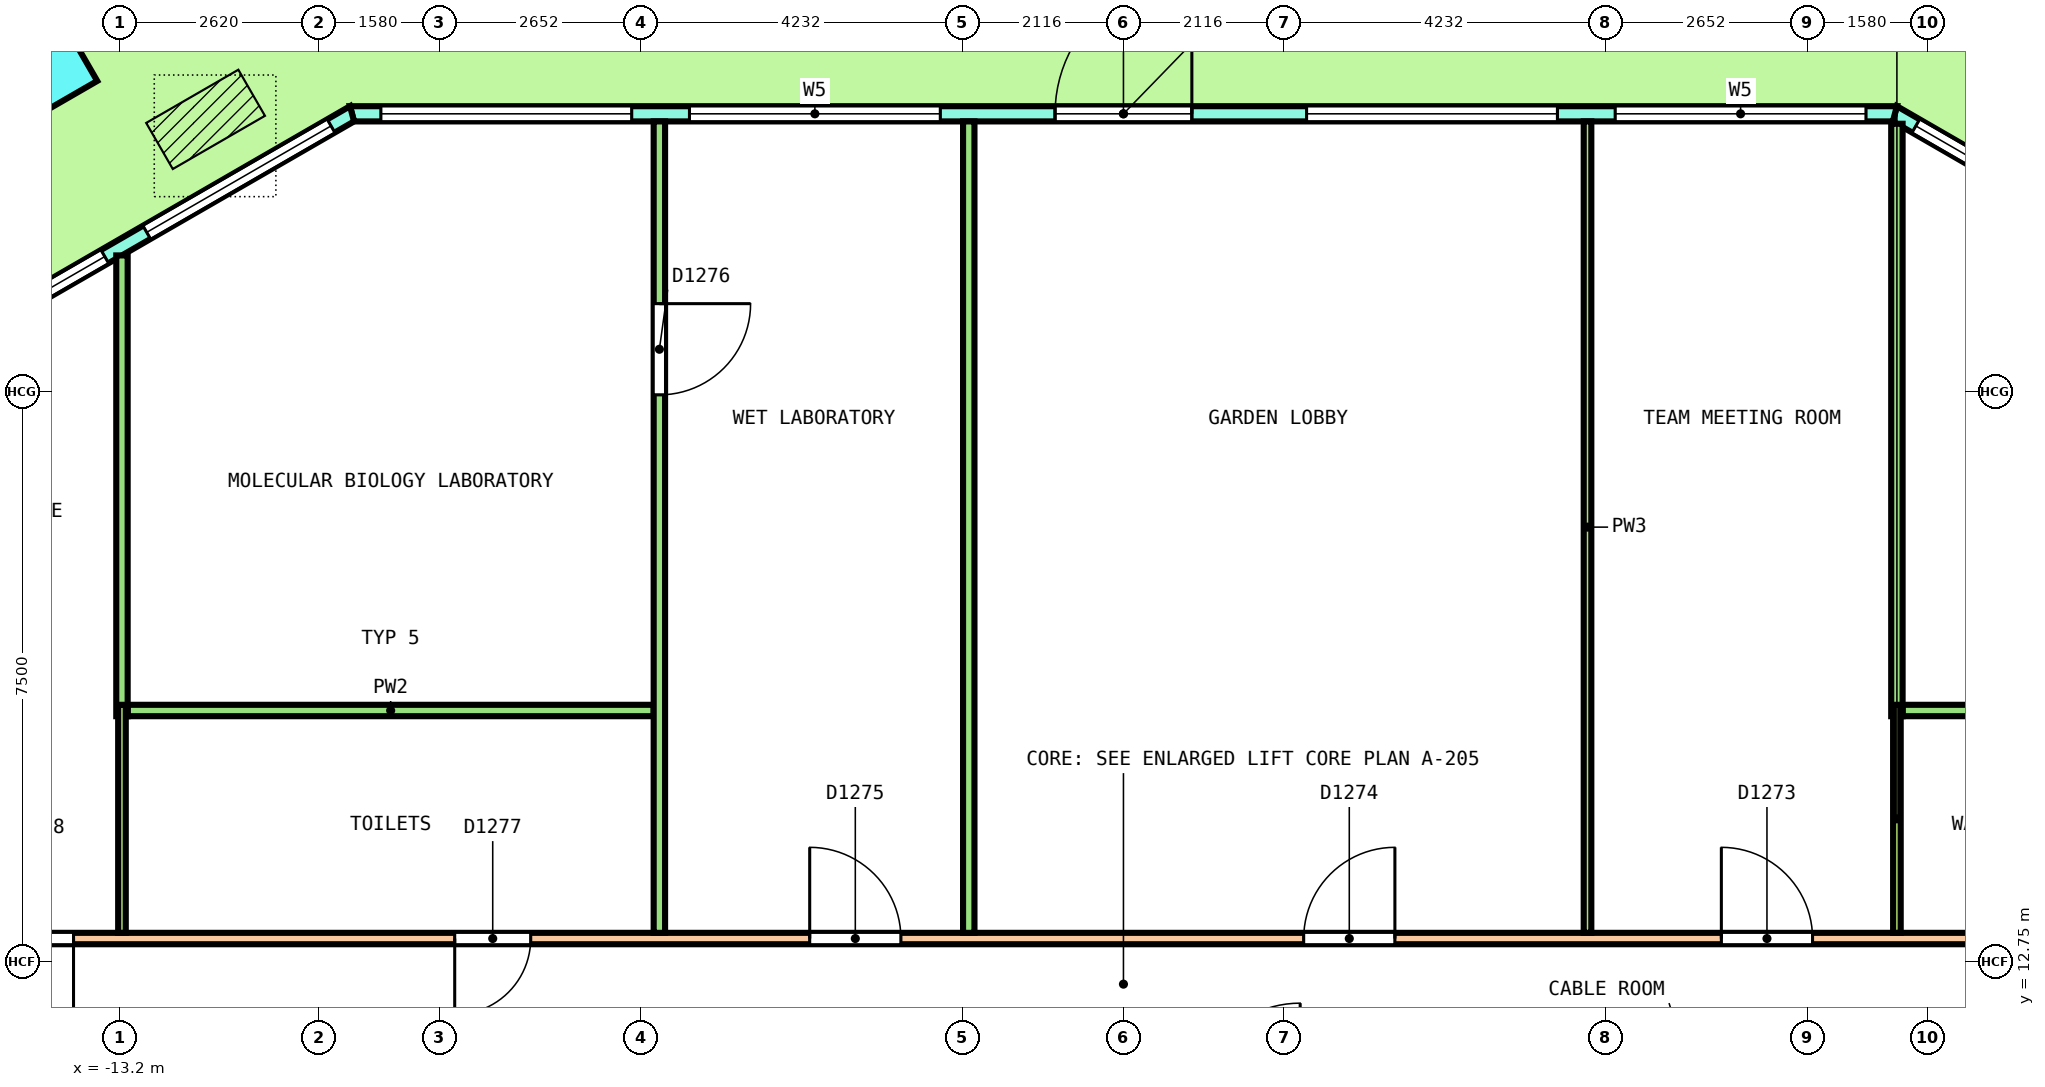
"""IFC4 building model, lengths in metres.
Left out: names, types, materials, properties, quantities, classifications, styles, units other than length and angle.
Written with IfcOpenShell. Run it as: python <this file> out.ifc"""

import sys

from ifc_helpers import new_model, si_unit, direction, frame, frame_2d, origin, origin_2d, place, context, subcontext, project, spatial, polyline, rectangle, outline, extrude, element, fill, save


model = new_model("IFC4")
c1 = context("Model", 3, precision=1e-05, world=origin(), true_north=direction((0.0, 1.0)))
c2 = subcontext(c1, "Body", "Model", "MODEL_VIEW")
j1 = project(units=[si_unit("LENGTHUNIT", "METRE"), si_unit("PLANEANGLEUNIT", "RADIAN")], contexts=[c1])
p1 = place(None, origin())
s1 = spatial("IfcSite", under=j1, at=p1, CompositionType="ELEMENT")
p2 = place(p1, origin())
s2 = spatial("IfcBuilding", under=s1, at=p2, CompositionType="ELEMENT")
p3 = place(p2, frame((0.0, 0.0, 23.4)))
s3 = spatial("IfcBuildingStorey", under=s2, at=p3, CompositionType="ELEMENT", Elevation=23.4)
p4 = place(p3, frame((-14.526, 24.606, 0.0), z_axis=(-0.036265236264, 0.0, 0.999342199969), x_axis=(-0.865313546461, -0.500246354177, -0.031401456084)))
e1 = element("IfcColumn", 1, at=p4, inside=s3, PredefinedType="COLUMN", context=c2, shape_type="SweptSolid", body=[
    extrude(rectangle(XDim=1.5, YDim=1.5, at=origin_2d()), origin(), (0.0, 0.0, 1.0), 4.053),
])
p5 = place(p3, frame((16.103, 20.463, 0.0), z_axis=(0.0, 0.0, 1.0), x_axis=(-0.866029458321, 0.49999297727, 0.0)))
e2 = element("IfcWall", 2, at=p5, inside=s3, PredefinedType="SOLIDWALL", context=c2, shape_type="SweptSolid", body=[
    extrude(outline(polyline([(-0.027, -0.1), (1.128, -0.1), (2.282, -0.1), (3.437, -0.1), (4.592, -0.1), (5.747, -0.1), (6.901, -0.1), (6.848, 0.1), (5.711, 0.1), (4.574, 0.1), (3.437, 0.1), (2.301, 0.1), (1.164, 0.1), (0.027, 0.1), (-0.027, -0.1)])), origin(), (0.0, 0.0, 1.0), 4.1),
])
p6 = place(p5, frame((0.319, 0.0, 0.1)))
e3 = element("IfcOpeningElement", 3, at=p6, cuts=e2, PredefinedType="OPENING", context=c2, shape_type="SweptSolid", body=[
    extrude(rectangle(XDim=2.8, YDim=2.9, at=frame_2d((1.4, 1.45))), frame((0.0, 0.11, 0.0), z_axis=(0.0, -1.0, 0.0), x_axis=(1.0, 0.0, 0.0)), (0.0, 0.0, 1.0), 0.22),
])
p7 = place(p5, frame((3.756, 0.0, 0.1)))
e4 = element("IfcOpeningElement", 4, at=p7, cuts=e2, PredefinedType="OPENING", context=c2, shape_type="SweptSolid", body=[
    extrude(rectangle(XDim=2.8, YDim=2.9, at=frame_2d((1.4, 1.45))), frame((0.0, 0.11, 0.0), z_axis=(0.0, -1.0, 0.0), x_axis=(1.0, 0.0, 0.0)), (0.0, 0.0, 1.0), 0.22),
])
p8 = place(p3, frame((10.149, 23.9, 0.0), z_axis=(0.0, 0.0, 1.0), x_axis=(-1.0, 0.0, 0.0)))
e5 = element("IfcWall", 5, at=p8, inside=s3, PredefinedType="SOLIDWALL", context=c2, shape_type="SweptSolid", body=[
    extrude(outline(polyline([(-0.027, -0.1), (0.991, -0.1), (2.008, -0.1), (3.026, -0.1), (4.043, -0.1), (5.061, -0.1), (6.079, -0.1), (7.096, -0.1), (8.114, -0.1), (9.131, -0.1), (10.149, -0.1), (11.167, -0.1), (12.184, -0.1), (13.202, -0.1), (14.219, -0.1), (15.237, -0.1), (16.254, -0.1), (17.272, -0.1), (18.29, -0.1), (19.307, -0.1), (20.325, -0.1), (20.271, 0.1), (19.259, 0.1), (18.247, 0.1), (17.234, 0.1), (16.222, 0.1), (15.21, 0.1), (14.198, 0.1), (13.186, 0.1), (12.173, 0.1), (11.161, 0.1), (10.149, 0.1), (9.137, 0.1), (8.125, 0.1), (7.112, 0.1), (6.1, 0.1), (5.088, 0.1), (4.076, 0.1), (3.063, 0.1), (2.051, 0.1), (1.039, 0.1), (0.027, 0.1), (-0.027, -0.1)])), origin(), (0.0, 0.0, 1.0), 4.1),
])
p9 = place(p8, frame((0.38, 0.0, 0.1)))
e6 = element("IfcOpeningElement", 6, at=p9, cuts=e5, PredefinedType="OPENING", context=c2, shape_type="SweptSolid", body=[
    extrude(rectangle(XDim=3.3, YDim=2.9, at=frame_2d((1.65, 1.45))), frame((0.0, 0.11, 0.0), z_axis=(0.0, -1.0, 0.0), x_axis=(1.0, 0.0, 0.0)), (0.0, 0.0, 1.0), 0.22),
])
p10 = place(p8, frame((4.439, 0.0, 0.1)))
e7 = element("IfcOpeningElement", 7, at=p10, cuts=e5, PredefinedType="OPENING", context=c2, shape_type="SweptSolid", body=[
    extrude(rectangle(XDim=3.3, YDim=2.9, at=frame_2d((1.65, 1.45))), frame((0.0, 0.11, 0.0), z_axis=(0.0, -1.0, 0.0), x_axis=(1.0, 0.0, 0.0)), (0.0, 0.0, 1.0), 0.22),
])
p11 = place(p8, frame((9.249, 0.0, 0.0)))
e8 = element("IfcOpeningElement", 8, at=p11, cuts=e5, PredefinedType="OPENING", context=c2, shape_type="SweptSolid", body=[
    extrude(rectangle(XDim=1.8, YDim=2.4, at=frame_2d((0.9, 1.2))), frame((0.0, 0.11, 0.0), z_axis=(0.0, -1.0, 0.0), x_axis=(1.0, 0.0, 0.0)), (0.0, 0.0, 1.0), 0.22),
])
p12 = place(p8, frame((9.249, 0.0, 2.55)))
e9 = element("IfcOpeningElement", 9, at=p12, cuts=e5, PredefinedType="OPENING", context=c2, shape_type="SweptSolid", body=[
    extrude(rectangle(XDim=1.8, YDim=0.45, at=frame_2d((0.9, 0.225))), frame((0.0, 0.11, 0.0), z_axis=(0.0, -1.0, 0.0), x_axis=(1.0, 0.0, 0.0)), (0.0, 0.0, 1.0), 0.22),
])
p13 = place(p8, frame((12.559, 0.0, 0.1)))
e10 = element("IfcOpeningElement", 10, at=p13, cuts=e5, PredefinedType="OPENING", context=c2, shape_type="SweptSolid", body=[
    extrude(rectangle(XDim=3.3, YDim=2.9, at=frame_2d((1.65, 1.45))), frame((0.0, 0.11, 0.0), z_axis=(0.0, -1.0, 0.0), x_axis=(1.0, 0.0, 0.0)), (0.0, 0.0, 1.0), 0.22),
])
p14 = place(p8, frame((16.618, 0.0, 0.1)))
e11 = element("IfcOpeningElement", 11, at=p14, cuts=e5, PredefinedType="OPENING", context=c2, shape_type="SweptSolid", body=[
    extrude(rectangle(XDim=3.3, YDim=2.9, at=frame_2d((1.65, 1.45))), frame((0.0, 0.11, 0.0), z_axis=(0.0, -1.0, 0.0), x_axis=(1.0, 0.0, 0.0)), (0.0, 0.0, 1.0), 0.22),
])
p15 = place(p3, frame((-10.149, 23.9, 0.0), z_axis=(0.0, 0.0, 1.0), x_axis=(-0.866029458321, -0.49999297727, 0.0)))
e12 = element("IfcWall", 12, at=p15, inside=s3, PredefinedType="SOLIDWALL", context=c2, shape_type="SweptSolid", body=[
    extrude(outline(polyline([(-0.027, -0.1), (1.128, -0.1), (2.282, -0.1), (3.437, -0.1), (4.592, -0.1), (5.747, -0.1), (6.901, -0.1), (6.848, 0.1), (5.711, 0.1), (4.574, 0.1), (3.437, 0.1), (2.301, 0.1), (1.164, 0.1), (0.027, 0.1), (-0.027, -0.1)])), origin(), (0.0, 0.0, 1.0), 4.1),
])
p16 = place(p15, frame((0.319, 0.0, 0.1)))
e13 = element("IfcOpeningElement", 13, at=p16, cuts=e12, PredefinedType="OPENING", context=c2, shape_type="SweptSolid", body=[
    extrude(rectangle(XDim=2.8, YDim=2.9, at=frame_2d((1.4, 1.45))), frame((0.0, 0.11, 0.0), z_axis=(0.0, -1.0, 0.0), x_axis=(1.0, 0.0, 0.0)), (0.0, 0.0, 1.0), 0.22),
])
p17 = place(p15, frame((3.756, 0.0, 0.1)))
e14 = element("IfcOpeningElement", 14, at=p17, cuts=e12, PredefinedType="OPENING", context=c2, shape_type="SweptSolid", body=[
    extrude(rectangle(XDim=2.8, YDim=2.9, at=frame_2d((1.4, 1.45))), frame((0.0, 0.11, 0.0), z_axis=(0.0, -1.0, 0.0), x_axis=(1.0, 0.0, 0.0)), (0.0, 0.0, 1.0), 0.22),
])
p18 = place(p3, frame((-15.375, 13.05, 0.0), z_axis=(0.0, 0.0, 1.0), x_axis=(1.0, 0.0, 0.0)))
e15 = element("IfcWall", 15, at=p18, inside=s3, PredefinedType="PARTITIONING", context=c2, shape_type="SweptSolid", body=[
    extrude(rectangle(XDim=30.75, YDim=0.15, at=frame_2d((15.375, 0.0))), origin(), (0.0, 0.0, 1.0), 3.05),
])
p19 = place(p18, frame((28.224, 0.0, 0.0)))
e16 = element("IfcOpeningElement", 16, at=p19, cuts=e15, PredefinedType="OPENING", context=c2, shape_type="SweptSolid", body=[
    extrude(rectangle(XDim=1.0, YDim=2.1, at=frame_2d((0.5, 1.05))), frame((0.0, 0.085, 0.0), z_axis=(0.0, -1.0, 0.0), x_axis=(1.0, 0.0, 0.0)), (0.0, 0.0, 1.0), 0.17),
])
p20 = place(p18, frame((23.241, 0.0, 0.0)))
e17 = element("IfcOpeningElement", 17, at=p20, cuts=e15, PredefinedType="OPENING", context=c2, shape_type="SweptSolid", body=[
    extrude(rectangle(XDim=1.2, YDim=2.1, at=frame_2d((0.6, 1.05))), frame((0.0, 0.085, 0.0), z_axis=(0.0, -1.0, 0.0), x_axis=(1.0, 0.0, 0.0)), (0.0, 0.0, 1.0), 0.17),
])
p21 = place(p18, frame((17.746, 0.0, 0.0)))
e18 = element("IfcOpeningElement", 18, at=p21, cuts=e15, PredefinedType="OPENING", context=c2, shape_type="SweptSolid", body=[
    extrude(rectangle(XDim=1.2, YDim=2.1, at=frame_2d((0.6, 1.05))), frame((0.0, 0.085, 0.0), z_axis=(0.0, -1.0, 0.0), x_axis=(1.0, 0.0, 0.0)), (0.0, 0.0, 1.0), 0.17),
])
p22 = place(p18, frame((11.247, 0.0, 0.0)))
e19 = element("IfcOpeningElement", 19, at=p22, cuts=e15, PredefinedType="OPENING", context=c2, shape_type="SweptSolid", body=[
    extrude(rectangle(XDim=1.2, YDim=2.1, at=frame_2d((0.6, 1.05))), frame((0.0, 0.085, 0.0), z_axis=(0.0, -1.0, 0.0), x_axis=(1.0, 0.0, 0.0)), (0.0, 0.0, 1.0), 0.17),
])
p23 = place(p18, frame((6.577, 0.0, 0.0)))
e20 = element("IfcOpeningElement", 20, at=p23, cuts=e15, PredefinedType="OPENING", context=c2, shape_type="SweptSolid", body=[
    extrude(rectangle(XDim=1.0, YDim=2.1, at=frame_2d((0.5, 1.05))), frame((0.0, 0.085, 0.0), z_axis=(0.0, -1.0, 0.0), x_axis=(1.0, 0.0, 0.0)), (0.0, 0.0, 1.0), 0.17),
])
p24 = place(p18, frame((0.562, 0.0, 0.0)))
e21 = element("IfcOpeningElement", 21, at=p24, cuts=e15, PredefinedType="OPENING", context=c2, shape_type="SweptSolid", body=[
    extrude(rectangle(XDim=1.0, YDim=2.1, at=frame_2d((0.5, 1.05))), frame((0.0, 0.085, 0.0), z_axis=(0.0, -1.0, 0.0), x_axis=(1.0, 0.0, 0.0)), (0.0, 0.0, 1.0), 0.17),
])
p25 = place(p3, frame((-13.101, 16.05, 0.0), z_axis=(0.0, 0.0, 1.0), x_axis=(1.0, 0.0, 0.0)))
e22 = element("IfcWall", 22, at=p25, inside=s3, PredefinedType="PARTITIONING", context=c2, shape_type="SweptSolid", body=[
    extrude(rectangle(XDim=6.92, YDim=0.15, at=frame_2d((3.46, 0.0))), origin(), (0.0, 0.0, 1.0), 3.05),
])
p26 = place(p3, frame((10.251, 16.05, 0.0), z_axis=(0.0, 0.0, 1.0), x_axis=(1.0, 0.0, 0.0)))
e23 = element("IfcWall", 23, at=p26, inside=s3, PredefinedType="PARTITIONING", context=c2, shape_type="SweptSolid", body=[
    extrude(rectangle(XDim=8.274, YDim=0.15, at=frame_2d((4.137, 0.0))), origin(), (0.0, 0.0, 1.0), 3.05),
])
p27 = place(p26, frame((3.174, 0.0, 0.0)))
e24 = element("IfcOpeningElement", 24, at=p27, cuts=e23, PredefinedType="OPENING", context=c2, shape_type="SweptSolid", body=[
    extrude(rectangle(XDim=1.0, YDim=2.1, at=frame_2d((0.5, 1.05))), frame((0.0, 0.085, 0.0), z_axis=(0.0, -1.0, 0.0), x_axis=(1.0, 0.0, 0.0)), (0.0, 0.0, 1.0), 0.17),
])
p28 = place(p3, frame((10.176, 15.975, 0.0), z_axis=(0.0, 0.0, 1.0), x_axis=(0.0, 1.0, 0.0)))
e25 = element("IfcWall", 25, at=p28, inside=s3, PredefinedType="PARTITIONING", context=c2, shape_type="SweptSolid", body=[
    extrude(rectangle(XDim=7.794, YDim=0.15, at=frame_2d((3.897, 0.0))), origin(), (0.0, 0.0, 1.0), 3.05),
])
p29 = place(p3, frame((-2.035, 13.125, 0.0), z_axis=(0.0, 0.0, 1.0), x_axis=(0.0, 1.0, 0.0)))
e26 = element("IfcWall", 26, at=p29, inside=s3, PredefinedType="PARTITIONING", context=c2, shape_type="SweptSolid", body=[
    extrude(rectangle(XDim=10.675, YDim=0.15, at=frame_2d((5.337, 0.0))), origin(), (0.0, 0.0, 1.0), 3.05),
])
p30 = place(p3, frame((-6.105, 13.125, 0.0), z_axis=(0.0, 0.0, 1.0), x_axis=(0.0, 1.0, 0.0)))
e27 = element("IfcWall", 27, at=p30, inside=s3, PredefinedType="PARTITIONING", context=c2, shape_type="SweptSolid", body=[
    extrude(rectangle(XDim=10.675, YDim=0.15, at=frame_2d((5.337, 0.0))), origin(), (0.0, 0.0, 1.0), 3.05),
])
p31 = place(p30, frame((7.077, 0.0, 0.0)))
e28 = element("IfcOpeningElement", 28, at=p31, cuts=e27, PredefinedType="OPENING", context=c2, shape_type="SweptSolid", body=[
    extrude(rectangle(XDim=1.2, YDim=2.1, at=frame_2d((0.6, 1.05))), frame((0.0, 0.085, 0.0), z_axis=(0.0, -1.0, 0.0), x_axis=(1.0, 0.0, 0.0)), (0.0, 0.0, 1.0), 0.17),
])
p32 = place(p3, frame((-13.176, 15.975, 0.0), z_axis=(0.0, 0.0, 1.0), x_axis=(0.0, 1.0, 0.0)))
e29 = element("IfcWall", 29, at=p32, inside=s3, PredefinedType="PARTITIONING", context=c2, shape_type="SweptSolid", body=[
    extrude(rectangle(XDim=6.062, YDim=0.15, at=frame_2d((3.031, 0.0))), origin(), (0.0, 0.0, 1.0), 3.05),
])
p33 = place(p3, frame((10.176, 13.125, 0.0), z_axis=(0.0, 0.0, 1.0), x_axis=(0.0, 1.0, 0.0)))
e30 = element("IfcWall", 30, at=p33, inside=s3, PredefinedType="PARTITIONING", context=c2, shape_type="SweptSolid", body=[
    extrude(rectangle(XDim=3.0, YDim=0.1, at=frame_2d((1.5, 0.0))), origin(), (0.0, 0.0, 1.0), 4.1),
])
p34 = place(p3, frame((6.105, 13.125, 0.0), z_axis=(0.0, 0.0, 1.0), x_axis=(0.0, 1.0, 0.0)))
e31 = element("IfcWall", 31, at=p34, inside=s3, PredefinedType="PARTITIONING", context=c2, shape_type="SweptSolid", body=[
    extrude(rectangle(XDim=10.675, YDim=0.1, at=frame_2d((5.337, 0.0))), origin(), (0.0, 0.0, 1.0), 3.05),
])
p35 = place(p3, frame((-13.176, 13.125, 0.0), z_axis=(0.0, 0.0, 1.0), x_axis=(0.0, 1.0, 0.0)))
e32 = element("IfcWall", 32, at=p35, inside=s3, PredefinedType="PARTITIONING", context=c2, shape_type="SweptSolid", body=[
    extrude(rectangle(XDim=3.0, YDim=0.1, at=frame_2d((1.5, 0.0))), origin(), (0.0, 0.0, 1.0), 3.05),
])
p36 = place(p7, origin())
e33 = element("IfcWindow", 33, at=p36, inside=s3, PartitioningType="SINGLE_PANEL", PredefinedType="WINDOW", context=c2, shape_type="SweptSolid", body=[
    extrude(rectangle(XDim=2.8, YDim=2.9, at=frame_2d((1.4, 1.45))), frame((0.0, 0.03, 0.0), z_axis=(0.0, -1.0, 0.0), x_axis=(1.0, 0.0, 0.0)), (0.0, 0.0, 1.0), 0.06),
])
fill(e4, e33)
p37 = place(p9, origin())
e34 = element("IfcWindow", 34, at=p37, inside=s3, PartitioningType="SINGLE_PANEL", PredefinedType="WINDOW", context=c2, shape_type="SweptSolid", body=[
    extrude(rectangle(XDim=3.3, YDim=2.9, at=frame_2d((1.65, 1.45))), frame((0.0, 0.03, 0.0), z_axis=(0.0, -1.0, 0.0), x_axis=(1.0, 0.0, 0.0)), (0.0, 0.0, 1.0), 0.06),
])
fill(e6, e34)
p38 = place(p10, origin())
e35 = element("IfcWindow", 35, at=p38, inside=s3, PartitioningType="SINGLE_PANEL", PredefinedType="WINDOW", context=c2, shape_type="SweptSolid", body=[
    extrude(rectangle(XDim=3.3, YDim=2.9, at=frame_2d((1.65, 1.45))), frame((0.0, 0.03, 0.0), z_axis=(0.0, -1.0, 0.0), x_axis=(1.0, 0.0, 0.0)), (0.0, 0.0, 1.0), 0.06),
])
fill(e7, e35)
p39 = place(p11, origin())
e36 = element("IfcDoor", 36, at=p39, inside=s3, OperationType="DOUBLE_DOOR_SINGLE_SWING", PredefinedType="DOOR", context=c2, shape_type="SweptSolid", body=[
    extrude(rectangle(XDim=1.8, YDim=2.4, at=frame_2d((0.9, 1.2))), frame((0.0, 0.025, 0.0), z_axis=(0.0, -1.0, 0.0), x_axis=(1.0, 0.0, 0.0)), (0.0, 0.0, 1.0), 0.05),
])
fill(e8, e36)
p40 = place(p12, origin())
e37 = element("IfcWindow", 37, at=p40, inside=s3, PartitioningType="SINGLE_PANEL", PredefinedType="WINDOW", context=c2, shape_type="SweptSolid", body=[
    extrude(rectangle(XDim=1.8, YDim=0.45, at=frame_2d((0.9, 0.225))), frame((0.0, 0.03, 0.0), z_axis=(0.0, -1.0, 0.0), x_axis=(1.0, 0.0, 0.0)), (0.0, 0.0, 1.0), 0.06),
])
fill(e9, e37)
p41 = place(p13, origin())
e38 = element("IfcWindow", 38, at=p41, inside=s3, PartitioningType="SINGLE_PANEL", PredefinedType="WINDOW", context=c2, shape_type="SweptSolid", body=[
    extrude(rectangle(XDim=3.3, YDim=2.9, at=frame_2d((1.65, 1.45))), frame((0.0, 0.03, 0.0), z_axis=(0.0, -1.0, 0.0), x_axis=(1.0, 0.0, 0.0)), (0.0, 0.0, 1.0), 0.06),
])
fill(e10, e38)
p42 = place(p14, origin())
e39 = element("IfcWindow", 39, at=p42, inside=s3, PartitioningType="SINGLE_PANEL", PredefinedType="WINDOW", context=c2, shape_type="SweptSolid", body=[
    extrude(rectangle(XDim=3.3, YDim=2.9, at=frame_2d((1.65, 1.45))), frame((0.0, 0.03, 0.0), z_axis=(0.0, -1.0, 0.0), x_axis=(1.0, 0.0, 0.0)), (0.0, 0.0, 1.0), 0.06),
])
fill(e11, e39)
p43 = place(p16, origin())
e40 = element("IfcWindow", 40, at=p43, inside=s3, PartitioningType="SINGLE_PANEL", PredefinedType="WINDOW", context=c2, shape_type="SweptSolid", body=[
    extrude(rectangle(XDim=2.8, YDim=2.9, at=frame_2d((1.4, 1.45))), frame((0.0, 0.03, 0.0), z_axis=(0.0, -1.0, 0.0), x_axis=(1.0, 0.0, 0.0)), (0.0, 0.0, 1.0), 0.06),
])
fill(e13, e40)
p44 = place(p17, origin())
e41 = element("IfcWindow", 41, at=p44, inside=s3, PartitioningType="SINGLE_PANEL", PredefinedType="WINDOW", context=c2, shape_type="SweptSolid", body=[
    extrude(rectangle(XDim=2.8, YDim=2.9, at=frame_2d((1.4, 1.45))), frame((0.0, 0.03, 0.0), z_axis=(0.0, -1.0, 0.0), x_axis=(1.0, 0.0, 0.0)), (0.0, 0.0, 1.0), 0.06),
])
fill(e14, e41)
p45 = place(p20, origin())
e42 = element("IfcDoor", 42, at=p45, inside=s3, OperationType="DOUBLE_DOOR_SINGLE_SWING", PredefinedType="DOOR", context=c2, shape_type="SweptSolid", body=[
    extrude(rectangle(XDim=1.2, YDim=2.1, at=frame_2d((0.6, 1.05))), frame((0.0, 0.025, 0.0), z_axis=(0.0, -1.0, 0.0), x_axis=(1.0, 0.0, 0.0)), (0.0, 0.0, 1.0), 0.05),
])
fill(e17, e42)
p46 = place(p21, origin())
e43 = element("IfcDoor", 43, at=p46, inside=s3, OperationType="DOUBLE_DOOR_SINGLE_SWING", PredefinedType="DOOR", context=c2, shape_type="SweptSolid", body=[
    extrude(rectangle(XDim=1.2, YDim=2.1, at=frame_2d((0.6, 1.05))), frame((0.0, 0.025, 0.0), z_axis=(0.0, -1.0, 0.0), x_axis=(1.0, 0.0, 0.0)), (0.0, 0.0, 1.0), 0.05),
])
fill(e18, e43)
p47 = place(p22, origin())
e44 = element("IfcDoor", 44, at=p47, inside=s3, OperationType="DOUBLE_DOOR_SINGLE_SWING", PredefinedType="DOOR", context=c2, shape_type="SweptSolid", body=[
    extrude(rectangle(XDim=1.2, YDim=2.1, at=frame_2d((0.6, 1.05))), frame((0.0, 0.025, 0.0), z_axis=(0.0, -1.0, 0.0), x_axis=(1.0, 0.0, 0.0)), (0.0, 0.0, 1.0), 0.05),
])
fill(e19, e44)
p48 = place(p31, origin())
e45 = element("IfcDoor", 45, at=p48, inside=s3, OperationType="DOUBLE_DOOR_SINGLE_SWING", PredefinedType="DOOR", context=c2, shape_type="SweptSolid", body=[
    extrude(rectangle(XDim=1.2, YDim=2.1, at=frame_2d((0.6, 1.05))), frame((0.0, 0.025, 0.0), z_axis=(0.0, -1.0, 0.0), x_axis=(1.0, 0.0, 0.0)), (0.0, 0.0, 1.0), 0.05),
])
fill(e28, e45)
p49 = place(p23, origin())
e46 = element("IfcDoor", 46, at=p49, inside=s3, OperationType="SINGLE_SWING_RIGHT", PredefinedType="DOOR", context=c2, shape_type="SweptSolid", body=[
    extrude(rectangle(XDim=1.0, YDim=2.1, at=frame_2d((0.5, 1.05))), frame((0.0, 0.025, 0.0), z_axis=(0.0, -1.0, 0.0), x_axis=(1.0, 0.0, 0.0)), (0.0, 0.0, 1.0), 0.05),
])
fill(e20, e46)
p50 = place(p24, origin())
e47 = element("IfcDoor", 47, at=p50, inside=s3, OperationType="SINGLE_SWING_LEFT", PredefinedType="DOOR", context=c2, shape_type="SweptSolid", body=[
    extrude(rectangle(XDim=1.0, YDim=2.1, at=frame_2d((0.5, 1.05))), frame((0.0, 0.025, 0.0), z_axis=(0.0, -1.0, 0.0), x_axis=(1.0, 0.0, 0.0)), (0.0, 0.0, 1.0), 0.05),
])
fill(e21, e47)
save(model, sys.argv[1])
